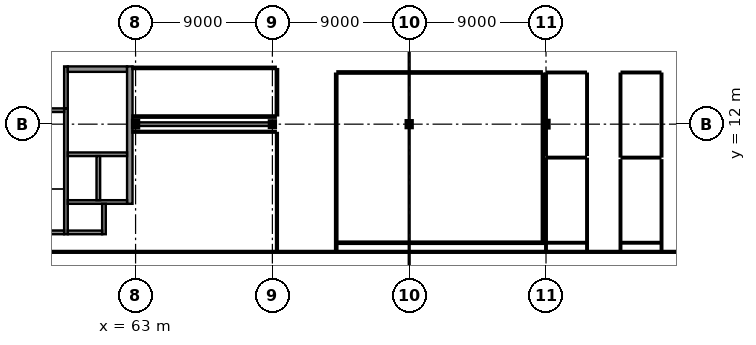
"""IFC4 building model, lengths in metres.
Left out: names, types, materials, properties, quantities, classifications, styles, units other than length and angle.
Written with IfcOpenShell. Run it as: python <this file> out.ifc"""

import sys

from ifc_helpers import new_model, si_unit, direction, frame, frame_2d, origin, origin_2d, place, context, subcontext, project, spatial, rectangle, i_section, extrude, element, fill, save


model = new_model("IFC4")
c1 = context("Model", 3, precision=1e-05, world=origin(), true_north=direction((0.0, 1.0)))
c2 = subcontext(c1, "Body", "Model", "MODEL_VIEW")
j1 = project(units=[si_unit("LENGTHUNIT", "METRE"), si_unit("PLANEANGLEUNIT", "RADIAN")], contexts=[c1])
p1 = place(None, origin())
s1 = spatial("IfcSite", under=j1, at=p1, CompositionType="ELEMENT")
p2 = place(p1, origin())
s2 = spatial("IfcBuilding", under=s1, at=p2, CompositionType="ELEMENT")
p3 = place(p2, frame((0.0, 0.0, 14.4)))
s3 = spatial("IfcBuildingStorey", under=s2, at=p3, CompositionType="ELEMENT", Elevation=14.4)
p4 = place(p3, frame((63.0, 12.0, 0.0), z_axis=(0.0, 0.0, 1.0), x_axis=(1.0, 0.0, 0.0)))
e1 = element("IfcColumn", 1, at=p4, inside=s3, PredefinedType="COLUMN", context=c2, shape_type="SweptSolid", body=[
    extrude(i_section(OverallWidth=0.3, OverallDepth=0.4, WebThickness=0.013, FlangeThickness=0.024, at=origin_2d()), origin(), (0.0, 0.0, 1.0), 4.5),
])
p5 = place(p3, frame((72.0, 12.0, 0.0), z_axis=(0.0, 0.0, 1.0), x_axis=(0.0, 1.0, 0.0)))
e2 = element("IfcColumn", 2, at=p5, inside=s3, PredefinedType="COLUMN", context=c2, shape_type="SweptSolid", body=[
    extrude(i_section(OverallWidth=0.3, OverallDepth=0.34, WebThickness=0.012, FlangeThickness=0.021, at=origin_2d()), origin(), (0.0, 0.0, 1.0), 4.5),
])
p6 = place(p3, frame((81.0, 12.0, 0.0), z_axis=(0.0, 0.0, 1.0), x_axis=(1.0, 0.0, 0.0)))
e3 = element("IfcColumn", 3, at=p6, inside=s3, PredefinedType="COLUMN", context=c2, shape_type="SweptSolid", body=[
    extrude(i_section(OverallWidth=0.3, OverallDepth=0.36, WebThickness=0.012, FlangeThickness=0.022, at=origin_2d()), origin(), (0.0, 0.0, 1.0), 4.5),
])
p7 = place(p3, frame((90.0, 12.0, 0.0), z_axis=(0.0, 0.0, 1.0), x_axis=(1.0, 0.0, 0.0)))
e4 = element("IfcColumn", 4, at=p7, inside=s3, PredefinedType="COLUMN", context=c2, shape_type="SweptSolid", body=[
    extrude(i_section(OverallWidth=0.3, OverallDepth=0.4, WebThickness=0.013, FlangeThickness=0.024, at=origin_2d()), origin(), (0.0, 0.0, 1.0), 4.5),
])
p8 = place(p3, frame((58.42, 4.76, 0.0), z_axis=(0.0, 0.0, 1.0), x_axis=(0.0, 1.0, 0.0)))
e5 = element("IfcWall", 5, at=p8, inside=s3, PredefinedType="SHEAR", context=c2, shape_type="SweptSolid", body=[
    extrude(rectangle(XDim=8.28, YDim=0.24, at=frame_2d((4.14, 0.0))), origin(), (0.0, 0.0, 1.0), 4.31),
])
p9 = place(p8, frame((6.49, 0.0, 0.0)))
e6 = element("IfcOpeningElement", 6, at=p9, cuts=e5, PredefinedType="OPENING", context=c2, shape_type="SweptSolid", body=[
    extrude(rectangle(XDim=1.3, YDim=2.2, at=frame_2d((0.65, 1.1))), frame((0.0, 0.135, 0.0), z_axis=(0.0, -1.0, 0.0), x_axis=(1.0, 0.0, 0.0)), (0.0, 0.0, 1.0), 0.27),
])
for number, where, z_axis, x_axis in (
    (7, (54.6, 4.88, 0.0), (0.0, 0.0, 1.0), (1.0, 0.0, 0.0)),
    (8, (54.6, 12.92, 0.0), (0.0, 0.0, 1.0), (1.0, 0.0, 0.0)),
):
    element("IfcWall", number, at=place(p3, frame(where, z_axis=z_axis, x_axis=x_axis)), inside=s3, PredefinedType="SHEAR", context=c2, shape_type="SweptSolid", body=[
        extrude(rectangle(XDim=3.7, YDim=0.24, at=frame_2d((1.85, 0.0))), origin(), (0.0, 0.0, 1.0), 4.31),
    ])
p10 = place(p3, frame((58.42, 13.04, 0.0), z_axis=(0.0, 0.0, 1.0), x_axis=(0.0, 1.0, 0.0)))
e9 = element("IfcWall", 9, at=p10, inside=s3, PredefinedType="SHEAR", context=c2, shape_type="SweptSolid", body=[
    extrude(rectangle(XDim=2.76, YDim=0.24, at=frame_2d((1.38, 0.0))), origin(), (0.0, 0.0, 1.0), 4.16),
])
p11 = place(p3, frame((58.54, 15.62, 0.0), z_axis=(0.0, 0.0, 1.0), x_axis=(1.0, 0.0, 0.0)))
e10 = element("IfcWall", 10, at=p11, inside=s3, PredefinedType="SHEAR", context=c2, shape_type="SweptSolid", body=[
    extrude(rectangle(XDim=3.9, YDim=0.36, at=frame_2d((1.95, 0.0))), origin(), (0.0, 0.0, 1.0), 4.16),
])
p12 = place(p11, frame((1.15, 0.0, 0.0)))
e11 = element("IfcOpeningElement", 11, at=p12, cuts=e10, PredefinedType="OPENING", context=c2, shape_type="SweptSolid", body=[
    extrude(rectangle(XDim=1.6, YDim=2.25, at=frame_2d((0.8, 1.125))), frame((0.0, 0.195, 0.0), z_axis=(0.0, -1.0, 0.0), x_axis=(1.0, 0.0, 0.0)), (0.0, 0.0, 1.0), 0.39),
])
p13 = place(p3, frame((62.62, 6.76, 0.0), z_axis=(0.0, 0.0, 1.0), x_axis=(0.0, 1.0, 0.0)))
e12 = element("IfcWall", 12, at=p13, inside=s3, PredefinedType="SHEAR", context=c2, shape_type="SweptSolid", body=[
    extrude(rectangle(XDim=9.04, YDim=0.36, at=frame_2d((4.52, 0.0))), origin(), (0.0, 0.0, 1.0), 4.16),
])
p14 = place(p3, frame((58.54, 10.02, 0.0), z_axis=(0.0, 0.0, 1.0), x_axis=(1.0, 0.0, 0.0)))
e13 = element("IfcWall", 13, at=p14, inside=s3, PredefinedType="SHEAR", context=c2, shape_type="SweptSolid", body=[
    extrude(rectangle(XDim=3.9, YDim=0.24, at=frame_2d((1.95, 0.0))), origin(), (0.0, 0.0, 1.0), 4.31),
])
p15 = place(p14, frame((0.235, 0.0, 0.0)))
e14 = element("IfcOpeningElement", 14, at=p15, cuts=e13, PredefinedType="OPENING", context=c2, shape_type="SweptSolid", body=[
    extrude(rectangle(XDim=1.6, YDim=2.3, at=frame_2d((0.8, 1.15))), frame((0.0, 0.135, 0.0), z_axis=(0.0, -1.0, 0.0), x_axis=(1.0, 0.0, 0.0)), (0.0, 0.0, 1.0), 0.27),
])
p16 = place(p14, frame((2.185, 0.0, 0.0)))
e15 = element("IfcOpeningElement", 15, at=p16, cuts=e13, PredefinedType="OPENING", context=c2, shape_type="SweptSolid", body=[
    extrude(rectangle(XDim=1.6, YDim=2.3, at=frame_2d((0.8, 1.15))), frame((0.0, 0.135, 0.0), z_axis=(0.0, -1.0, 0.0), x_axis=(1.0, 0.0, 0.0)), (0.0, 0.0, 1.0), 0.27),
])
p17 = place(p3, frame((58.54, 6.88, 0.0), z_axis=(0.0, 0.0, 1.0), x_axis=(1.0, 0.0, 0.0)))
e16 = element("IfcWall", 16, at=p17, inside=s3, PredefinedType="SHEAR", context=c2, shape_type="SweptSolid", body=[
    extrude(rectangle(XDim=3.9, YDim=0.24, at=frame_2d((1.95, 0.0))), origin(), (0.0, 0.0, 1.0), 4.31),
])
p18 = place(p3, frame((60.55, 7.0, 0.0), z_axis=(0.0, 0.0, 1.0), x_axis=(0.0, 1.0, 0.0)))
e17 = element("IfcWall", 17, at=p18, inside=s3, PredefinedType="SHEAR", context=c2, shape_type="SweptSolid", body=[
    extrude(rectangle(XDim=2.9, YDim=0.24, at=frame_2d((1.45, 0.0))), origin(), (0.0, 0.0, 1.0), 4.31),
])
p19 = place(p3, frame((60.92, 4.76, 0.0), z_axis=(0.0, 0.0, 1.0), x_axis=(0.0, 1.0, 0.0)))
e18 = element("IfcWall", 18, at=p19, inside=s3, PredefinedType="SHEAR", context=c2, shape_type="SweptSolid", body=[
    extrude(rectangle(XDim=2.0, YDim=0.24, at=frame_2d((1.0, 0.0))), origin(), (0.0, 0.0, 1.0), 4.31),
])
p20 = place(p3, frame((58.54, 4.88, 0.0), z_axis=(0.0, 0.0, 1.0), x_axis=(1.0, 0.0, 0.0)))
e19 = element("IfcWall", 19, at=p20, inside=s3, PredefinedType="SHEAR", context=c2, shape_type="SweptSolid", body=[
    extrude(rectangle(XDim=2.26, YDim=0.24, at=frame_2d((1.13, 0.0))), origin(), (0.0, 0.0, 1.0), 4.31),
])
p21 = place(p3, frame((63.008, 12.0, 0.0), z_axis=(0.0, 0.0, 1.0), x_axis=(1.0, 0.0, 0.0)))
e20 = element("IfcWall", 20, at=p21, inside=s3, PredefinedType="SHEAR", context=c2, shape_type="SweptSolid", body=[
    extrude(rectangle(XDim=8.824, YDim=0.24, at=frame_2d((4.412, 0.0))), origin(), (0.0, 0.0, 1.0), 3.575),
])
p22 = place(p3, frame((53.87, 3.6, 0.0), z_axis=(0.0, 0.0, 1.0), x_axis=(1.0, 0.0, 0.0)))
e21 = element("IfcWall", 21, at=p22, inside=s3, PredefinedType="PARTITIONING", context=c2, shape_type="SweptSolid", body=[
    extrude(rectangle(XDim=63.25, YDim=0.12, at=frame_2d((31.625, 0.0))), origin(), (0.0, 0.0, 1.0), 4.14),
])
p23 = place(p22, frame((19.855, 0.0, 0.0)))
e22 = element("IfcOpeningElement", 22, at=p23, cuts=e21, PredefinedType="OPENING", context=c2, shape_type="SweptSolid", body=[
    extrude(rectangle(XDim=0.95, YDim=2.15, at=frame_2d((0.475, 1.075))), frame((0.0, 0.075, 0.0), z_axis=(0.0, -1.0, 0.0), x_axis=(1.0, 0.0, 0.0)), (0.0, 0.0, 1.0), 0.15),
])
p24 = place(p3, frame((62.795, 11.5, 0.0), z_axis=(0.0, 0.0, 1.0), x_axis=(1.0, 0.0, 0.0)))
e23 = element("IfcWall", 23, at=p24, inside=s3, PredefinedType="PARTITIONING", context=c2, shape_type="SweptSolid", body=[
    extrude(rectangle(XDim=9.425, YDim=0.12, at=frame_2d((4.712, 0.0))), origin(), (0.0, 0.0, 1.0), 4.14),
])
p25 = place(p3, frame((72.3, 11.42, 0.0), z_axis=(0.0, 0.0, 1.0), x_axis=(0.0, -1.0, 0.0)))
e24 = element("IfcWall", 24, at=p25, inside=s3, PredefinedType="PARTITIONING", context=c2, shape_type="SweptSolid", body=[
    extrude(rectangle(XDim=7.765, YDim=0.12, at=frame_2d((3.882, 0.0))), origin(), (0.0, 0.0, 1.0), 4.14),
])
p26 = place(p25, frame((3.433, 0.0, 0.0)))
e25 = element("IfcOpeningElement", 25, at=p26, cuts=e24, PredefinedType="OPENING", context=c2, shape_type="SweptSolid", body=[
    extrude(rectangle(XDim=0.9, YDim=2.1, at=frame_2d((0.45, 1.05))), frame((0.0, 0.075, 0.0), z_axis=(0.0, -1.0, 0.0), x_axis=(1.0, 0.0, 0.0)), (0.0, 0.0, 1.0), 0.15),
])
p27 = place(p3, frame((62.795, 15.7, 0.0), z_axis=(0.0, 0.0, 1.0), x_axis=(1.0, 0.0, 0.0)))
e26 = element("IfcWall", 26, at=p27, inside=s3, PredefinedType="PARTITIONING", context=c2, shape_type="SweptSolid", body=[
    extrude(rectangle(XDim=9.425, YDim=0.15, at=frame_2d((4.712, 0.0))), origin(), (0.0, 0.0, 1.0), 4.14),
])
p28 = place(p27, frame((4.187, 0.0, 0.0)))
e27 = element("IfcOpeningElement", 27, at=p28, cuts=e26, PredefinedType="OPENING", context=c2, shape_type="SweptSolid", body=[
    extrude(rectangle(XDim=1.05, YDim=2.25, at=frame_2d((0.525, 1.125))), frame((0.0, 0.09, 0.0), z_axis=(0.0, -1.0, 0.0), x_axis=(1.0, 0.0, 0.0)), (0.0, 0.0, 1.0), 0.18),
])
p29 = place(p3, frame((72.3, 15.62, 0.0), z_axis=(0.0, 0.0, 1.0), x_axis=(0.0, -1.0, 0.0)))
e28 = element("IfcWall", 28, at=p29, inside=s3, PredefinedType="PARTITIONING", context=c2, shape_type="SweptSolid", body=[
    extrude(rectangle(XDim=3.04, YDim=0.15, at=frame_2d((1.52, 0.0))), origin(), (0.0, 0.0, 1.0), 4.14),
])
p30 = place(p3, frame((72.22, 12.5, 0.0), z_axis=(0.0, 0.0, 1.0), x_axis=(-1.0, 0.0, 0.0)))
e29 = element("IfcWall", 29, at=p30, inside=s3, PredefinedType="PARTITIONING", context=c2, shape_type="SweptSolid", body=[
    extrude(rectangle(XDim=9.425, YDim=0.15, at=frame_2d((4.712, 0.0))), origin(), (0.0, 0.0, 1.0), 4.14),
])
p31 = place(p3, frame((92.62, 4.2, 0.0), z_axis=(0.0, 0.0, 1.0), x_axis=(-1.0, 0.0, 0.0)))
e30 = element("IfcWall", 30, at=p31, inside=s3, PredefinedType="PARTITIONING", context=c2, shape_type="SweptSolid", body=[
    extrude(rectangle(XDim=2.54, YDim=0.1, at=frame_2d((1.27, 0.0))), origin(), (0.0, 0.0, 1.0), 4.14),
])
p32 = place(p3, frame((90.0, 3.655, 0.0), z_axis=(0.0, 0.0, 1.0), x_axis=(0.0, 1.0, 0.0)))
e31 = element("IfcWall", 31, at=p32, inside=s3, PredefinedType="PARTITIONING", context=c2, shape_type="SweptSolid", body=[
    extrude(rectangle(XDim=6.065, YDim=0.1, at=frame_2d((3.032, 0.0))), origin(), (0.0, 0.0, 1.0), 3.735),
])
p33 = place(p3, frame((90.08, 9.8, 0.0), z_axis=(0.0, 0.0, 1.0), x_axis=(1.0, 0.0, 0.0)))
e32 = element("IfcWall", 32, at=p33, inside=s3, PredefinedType="PARTITIONING", context=c2, shape_type="SweptSolid", body=[
    extrude(rectangle(XDim=2.54, YDim=0.1, at=frame_2d((1.27, 0.0))), origin(), (0.0, 0.0, 1.0), 4.14),
])
p34 = place(p3, frame((92.7, 9.72, 0.0), z_axis=(0.0, 0.0, 1.0), x_axis=(0.0, -1.0, 0.0)))
e33 = element("IfcWall", 33, at=p34, inside=s3, PredefinedType="PARTITIONING", context=c2, shape_type="SweptSolid", body=[
    extrude(rectangle(XDim=6.065, YDim=0.1, at=frame_2d((3.032, 0.0))), origin(), (0.0, 0.0, 1.0), 4.14),
])
p35 = place(p34, frame((2.529, 0.0, 0.0)))
e34 = element("IfcOpeningElement", 34, at=p35, cuts=e33, PredefinedType="OPENING", context=c2, shape_type="SweptSolid", body=[
    extrude(rectangle(XDim=0.9, YDim=2.05, at=frame_2d((0.45, 1.025))), frame((0.0, 0.065, 0.0), z_axis=(0.0, -1.0, 0.0), x_axis=(1.0, 0.0, 0.0)), (0.0, 0.0, 1.0), 0.13),
])
p36 = place(p3, frame((90.08, 15.4, 0.0), z_axis=(0.0, 0.0, 1.0), x_axis=(1.0, 0.0, 0.0)))
e35 = element("IfcWall", 35, at=p36, inside=s3, PredefinedType="PARTITIONING", context=c2, shape_type="SweptSolid", body=[
    extrude(rectangle(XDim=2.54, YDim=0.1, at=frame_2d((1.27, 0.0))), origin(), (0.0, 0.0, 1.0), 4.14),
])
p37 = place(p3, frame((92.7, 15.32, 0.0), z_axis=(0.0, 0.0, 1.0), x_axis=(0.0, -1.0, 0.0)))
e36 = element("IfcWall", 36, at=p37, inside=s3, PredefinedType="PARTITIONING", context=c2, shape_type="SweptSolid", body=[
    extrude(rectangle(XDim=5.34, YDim=0.1, at=frame_2d((2.67, 0.0))), origin(), (0.0, 0.0, 1.0), 4.14),
])
p38 = place(p37, frame((2.22, 0.0, 0.0)))
e37 = element("IfcOpeningElement", 37, at=p38, cuts=e36, PredefinedType="OPENING", context=c2, shape_type="SweptSolid", body=[
    extrude(rectangle(XDim=0.9, YDim=2.05, at=frame_2d((0.45, 1.025))), frame((0.0, 0.065, 0.0), z_axis=(0.0, -1.0, 0.0), x_axis=(1.0, 0.0, 0.0)), (0.0, 0.0, 1.0), 0.13),
])
p39 = place(p3, frame((90.0, 9.98, 0.0), z_axis=(0.0, 0.0, 1.0), x_axis=(0.0, 1.0, 0.0)))
e38 = element("IfcWall", 38, at=p39, inside=s3, PredefinedType="PARTITIONING", context=c2, shape_type="SweptSolid", body=[
    extrude(rectangle(XDim=5.34, YDim=0.1, at=frame_2d((2.67, 0.0))), origin(), (0.0, 0.0, 1.0), 3.735),
])
p40 = place(p3, frame((94.98, 15.4, 0.0), z_axis=(0.0, 0.0, 1.0), x_axis=(1.0, 0.0, 0.0)))
e39 = element("IfcWall", 39, at=p40, inside=s3, PredefinedType="PARTITIONING", context=c2, shape_type="SweptSolid", body=[
    extrude(rectangle(XDim=2.54, YDim=0.1, at=frame_2d((1.27, 0.0))), origin(), (0.0, 0.0, 1.0), 4.14),
])
p41 = place(p3, frame((97.6, 15.32, 0.0), z_axis=(0.0, 0.0, 1.0), x_axis=(0.0, -1.0, 0.0)))
e40 = element("IfcWall", 40, at=p41, inside=s3, PredefinedType="PARTITIONING", context=c2, shape_type="SweptSolid", body=[
    extrude(rectangle(XDim=5.44, YDim=0.1, at=frame_2d((2.72, 0.0))), origin(), (0.0, 0.0, 1.0), 4.14),
])
p42 = place(p3, frame((97.52, 9.8, 0.0), z_axis=(0.0, 0.0, 1.0), x_axis=(-1.0, 0.0, 0.0)))
e41 = element("IfcWall", 41, at=p42, inside=s3, PredefinedType="PARTITIONING", context=c2, shape_type="SweptSolid", body=[
    extrude(rectangle(XDim=2.54, YDim=0.1, at=frame_2d((1.27, 0.0))), origin(), (0.0, 0.0, 1.0), 4.14),
])
p43 = place(p3, frame((94.9, 9.88, 0.0), z_axis=(0.0, 0.0, 1.0), x_axis=(0.0, 1.0, 0.0)))
e42 = element("IfcWall", 42, at=p43, inside=s3, PredefinedType="PARTITIONING", context=c2, shape_type="SweptSolid", body=[
    extrude(rectangle(XDim=5.44, YDim=0.1, at=frame_2d((2.72, 0.0))), origin(), (0.0, 0.0, 1.0), 4.14),
])
p44 = place(p43, frame((2.22, 0.0, 0.0)))
e43 = element("IfcOpeningElement", 43, at=p44, cuts=e42, PredefinedType="OPENING", context=c2, shape_type="SweptSolid", body=[
    extrude(rectangle(XDim=1.0, YDim=2.1, at=frame_2d((0.5, 1.05))), frame((0.0, 0.065, 0.0), z_axis=(0.0, -1.0, 0.0), x_axis=(1.0, 0.0, 0.0)), (0.0, 0.0, 1.0), 0.13),
])
p45 = place(p3, frame((97.6, 9.62, 0.0), z_axis=(0.0, 0.0, 1.0), x_axis=(0.0, -1.0, 0.0)))
e44 = element("IfcWall", 44, at=p45, inside=s3, PredefinedType="PARTITIONING", context=c2, shape_type="SweptSolid", body=[
    extrude(rectangle(XDim=5.965, YDim=0.1, at=frame_2d((2.982, 0.0))), origin(), (0.0, 0.0, 1.0), 4.14),
])
p46 = place(p3, frame((97.555, 4.2, 0.0), z_axis=(0.0, 0.0, 1.0), x_axis=(-1.0, 0.0, 0.0)))
e45 = element("IfcWall", 45, at=p46, inside=s3, PredefinedType="PARTITIONING", context=c2, shape_type="SweptSolid", body=[
    extrude(rectangle(XDim=2.575, YDim=0.1, at=frame_2d((1.288, 0.0))), origin(), (0.0, 0.0, 1.0), 4.14),
])
p47 = place(p3, frame((94.9, 3.655, 0.0), z_axis=(0.0, 0.0, 1.0), x_axis=(0.0, 1.0, 0.0)))
e46 = element("IfcWall", 46, at=p47, inside=s3, PredefinedType="PARTITIONING", context=c2, shape_type="SweptSolid", body=[
    extrude(rectangle(XDim=5.965, YDim=0.1, at=frame_2d((2.982, 0.0))), origin(), (0.0, 0.0, 1.0), 4.14),
])
p48 = place(p47, frame((2.586, 0.0, 0.0)))
e47 = element("IfcOpeningElement", 47, at=p48, cuts=e46, PredefinedType="OPENING", context=c2, shape_type="SweptSolid", body=[
    extrude(rectangle(XDim=0.9, YDim=2.05, at=frame_2d((0.45, 1.025))), frame((0.0, 0.065, 0.0), z_axis=(0.0, -1.0, 0.0), x_axis=(1.0, 0.0, 0.0)), (0.0, 0.0, 1.0), 0.13),
])
p49 = place(p3, frame((89.955, 4.2, 0.0), z_axis=(0.0, 0.0, 1.0), x_axis=(-1.0, 0.0, 0.0)))
e48 = element("IfcWall", 48, at=p49, inside=s3, PredefinedType="PARTITIONING", context=c2, shape_type="SweptSolid", body=[
    extrude(rectangle(XDim=13.675, YDim=0.15, at=frame_2d((6.837, 0.0))), origin(), (0.0, 0.0, 1.0), 4.14),
])
p50 = place(p3, frame((76.2, 3.655, 0.0), z_axis=(0.0, 0.0, 1.0), x_axis=(0.0, 1.0, 0.0)))
e49 = element("IfcWall", 49, at=p50, inside=s3, PredefinedType="PARTITIONING", context=c2, shape_type="SweptSolid", body=[
    extrude(rectangle(XDim=11.665, YDim=0.15, at=frame_2d((5.833, 0.0))), origin(), (0.0, 0.0, 1.0), 4.14),
])
p51 = place(p3, frame((76.28, 15.4, 0.0), z_axis=(0.0, 0.0, 1.0), x_axis=(1.0, 0.0, 0.0)))
e50 = element("IfcWall", 50, at=p51, inside=s3, PredefinedType="PARTITIONING", context=c2, shape_type="SweptSolid", body=[
    extrude(rectangle(XDim=13.44, YDim=0.15, at=frame_2d((6.72, 0.0))), origin(), (0.0, 0.0, 1.0), 4.14),
])
p52 = place(p51, frame((6.195, 0.0, 0.0)))
e51 = element("IfcOpeningElement", 51, at=p52, cuts=e50, PredefinedType="OPENING", context=c2, shape_type="SweptSolid", body=[
    extrude(rectangle(XDim=1.05, YDim=2.25, at=frame_2d((0.525, 1.125))), frame((0.0, 0.09, 0.0), z_axis=(0.0, -1.0, 0.0), x_axis=(1.0, 0.0, 0.0)), (0.0, 0.0, 1.0), 0.18),
])
p53 = place(p3, frame((89.8, 15.32, 0.0), z_axis=(0.0, 0.0, 1.0), x_axis=(0.0, -1.0, 0.0)))
e52 = element("IfcWall", 52, at=p53, inside=s3, PredefinedType="PARTITIONING", context=c2, shape_type="SweptSolid", body=[
    extrude(rectangle(XDim=11.05, YDim=0.15, at=frame_2d((5.525, 0.0))), origin(), (0.0, 0.0, 1.0), 3.735),
])
p54 = place(p9, frame((1.3, 0.0, 0.0), z_axis=(0.0, 0.0, 1.0), x_axis=(-1.0, 0.0, 0.0)))
e53 = element("IfcDoor", 53, at=p54, inside=s3, OperationType="SINGLE_SWING_LEFT", PredefinedType="DOOR", context=c2, shape_type="SweptSolid", body=[
    extrude(rectangle(XDim=1.3, YDim=2.2, at=frame_2d((0.65, 1.1))), frame((0.0, 0.025, 0.0), z_axis=(0.0, -1.0, 0.0), x_axis=(1.0, 0.0, 0.0)), (0.0, 0.0, 1.0), 0.05),
])
fill(e6, e53)
p55 = place(p12, origin())
e54 = element("IfcDoor", 54, at=p55, inside=s3, OperationType="DOUBLE_DOOR_SINGLE_SWING", PredefinedType="DOOR", context=c2, shape_type="SweptSolid", body=[
    extrude(rectangle(XDim=1.6, YDim=2.25, at=frame_2d((0.8, 1.125))), frame((0.0, 0.025, 0.0), z_axis=(0.0, -1.0, 0.0), x_axis=(1.0, 0.0, 0.0)), (0.0, 0.0, 1.0), 0.05),
])
fill(e11, e54)
p56 = place(p15, origin())
e55 = element("IfcDoor", 55, at=p56, inside=s3, OperationType="DOUBLE_DOOR_SLIDING", PredefinedType="DOOR", context=c2, shape_type="SweptSolid", body=[
    extrude(rectangle(XDim=1.6, YDim=2.3, at=frame_2d((0.8, 1.15))), frame((0.0, 0.025, 0.0), z_axis=(0.0, -1.0, 0.0), x_axis=(1.0, 0.0, 0.0)), (0.0, 0.0, 1.0), 0.05),
])
fill(e14, e55)
p57 = place(p16, origin())
e56 = element("IfcDoor", 56, at=p57, inside=s3, OperationType="DOUBLE_DOOR_SLIDING", PredefinedType="DOOR", context=c2, shape_type="SweptSolid", body=[
    extrude(rectangle(XDim=1.6, YDim=2.3, at=frame_2d((0.8, 1.15))), frame((0.0, 0.025, 0.0), z_axis=(0.0, -1.0, 0.0), x_axis=(1.0, 0.0, 0.0)), (0.0, 0.0, 1.0), 0.05),
])
fill(e15, e56)
p58 = place(p23, origin())
e57 = element("IfcDoor", 57, at=p58, inside=s3, OperationType="SINGLE_SWING_LEFT", PredefinedType="DOOR", context=c2, shape_type="SweptSolid", body=[
    extrude(rectangle(XDim=0.95, YDim=2.15, at=frame_2d((0.475, 1.075))), frame((0.0, 0.025, 0.0), z_axis=(0.0, -1.0, 0.0), x_axis=(1.0, 0.0, 0.0)), (0.0, 0.0, 1.0), 0.05),
])
fill(e22, e57)
p59 = place(p26, origin())
e58 = element("IfcDoor", 58, at=p59, inside=s3, OperationType="SINGLE_SWING_RIGHT", PredefinedType="DOOR", context=c2, shape_type="SweptSolid", body=[
    extrude(rectangle(XDim=0.9, YDim=2.1, at=frame_2d((0.45, 1.05))), frame((0.0, 0.025, 0.0), z_axis=(0.0, -1.0, 0.0), x_axis=(1.0, 0.0, 0.0)), (0.0, 0.0, 1.0), 0.05),
])
fill(e25, e58)
p60 = place(p28, frame((1.05, 0.0, 0.0), z_axis=(0.0, 0.0, 1.0), x_axis=(-1.0, 0.0, 0.0)))
e59 = element("IfcDoor", 59, at=p60, inside=s3, OperationType="SINGLE_SWING_LEFT", PredefinedType="DOOR", context=c2, shape_type="SweptSolid", body=[
    extrude(rectangle(XDim=1.05, YDim=2.25, at=frame_2d((0.525, 1.125))), frame((0.0, 0.025, 0.0), z_axis=(0.0, -1.0, 0.0), x_axis=(1.0, 0.0, 0.0)), (0.0, 0.0, 1.0), 0.05),
])
fill(e27, e59)
p61 = place(p35, frame((0.9, 0.0, 0.0), z_axis=(0.0, 0.0, 1.0), x_axis=(-1.0, 0.0, 0.0)))
e60 = element("IfcDoor", 60, at=p61, inside=s3, OperationType="SINGLE_SWING_LEFT", PredefinedType="DOOR", context=c2, shape_type="SweptSolid", body=[
    extrude(rectangle(XDim=0.9, YDim=2.05, at=frame_2d((0.45, 1.025))), frame((0.0, 0.025, 0.0), z_axis=(0.0, -1.0, 0.0), x_axis=(1.0, 0.0, 0.0)), (0.0, 0.0, 1.0), 0.05),
])
fill(e34, e60)
p62 = place(p38, origin())
e61 = element("IfcDoor", 61, at=p62, inside=s3, OperationType="SINGLE_SWING_RIGHT", PredefinedType="DOOR", context=c2, shape_type="SweptSolid", body=[
    extrude(rectangle(XDim=0.9, YDim=2.05, at=frame_2d((0.45, 1.025))), frame((0.0, 0.025, 0.0), z_axis=(0.0, -1.0, 0.0), x_axis=(1.0, 0.0, 0.0)), (0.0, 0.0, 1.0), 0.05),
])
fill(e37, e61)
p63 = place(p44, frame((1.0, 0.0, 0.0), z_axis=(0.0, 0.0, 1.0), x_axis=(-1.0, 0.0, 0.0)))
e62 = element("IfcDoor", 62, at=p63, inside=s3, OperationType="SINGLE_SWING_LEFT", PredefinedType="DOOR", context=c2, shape_type="SweptSolid", body=[
    extrude(rectangle(XDim=1.0, YDim=2.1, at=frame_2d((0.5, 1.05))), frame((0.0, 0.025, 0.0), z_axis=(0.0, -1.0, 0.0), x_axis=(1.0, 0.0, 0.0)), (0.0, 0.0, 1.0), 0.05),
])
fill(e43, e62)
p64 = place(p48, origin())
e63 = element("IfcDoor", 63, at=p64, inside=s3, OperationType="SINGLE_SWING_RIGHT", PredefinedType="DOOR", context=c2, shape_type="SweptSolid", body=[
    extrude(rectangle(XDim=0.9, YDim=2.05, at=frame_2d((0.45, 1.025))), frame((0.0, 0.025, 0.0), z_axis=(0.0, -1.0, 0.0), x_axis=(1.0, 0.0, 0.0)), (0.0, 0.0, 1.0), 0.05),
])
fill(e47, e63)
p65 = place(p52, frame((1.05, 0.0, 0.0), z_axis=(0.0, 0.0, 1.0), x_axis=(-1.0, 0.0, 0.0)))
e64 = element("IfcDoor", 64, at=p65, inside=s3, OperationType="SINGLE_SWING_LEFT", PredefinedType="DOOR", context=c2, shape_type="SweptSolid", body=[
    extrude(rectangle(XDim=1.05, YDim=2.25, at=frame_2d((0.525, 1.125))), frame((0.0, 0.025, 0.0), z_axis=(0.0, -1.0, 0.0), x_axis=(1.0, 0.0, 0.0)), (0.0, 0.0, 1.0), 0.05),
])
fill(e51, e64)
save(model, sys.argv[1])
